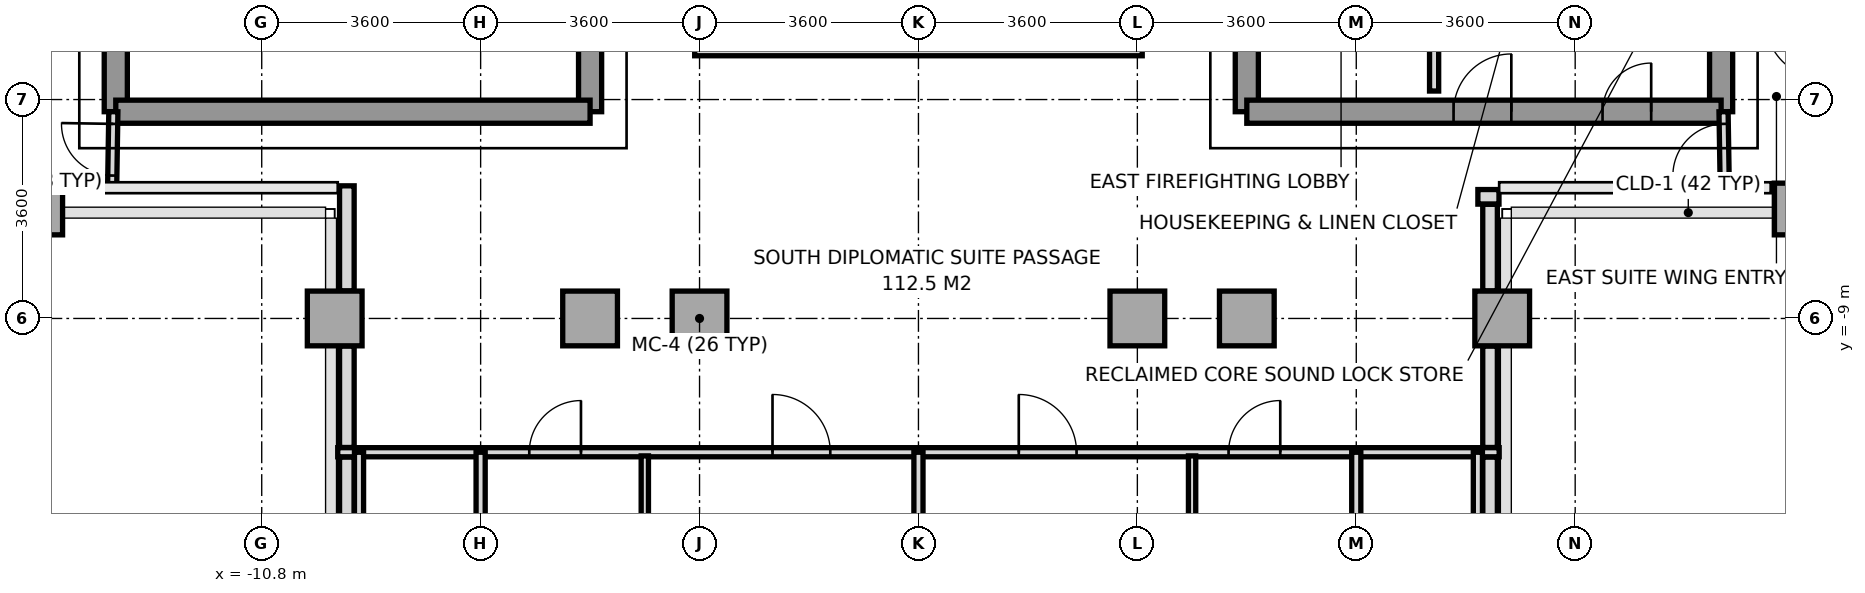
"""IFC4 building model, lengths in metres.
Left out: names, types, materials, properties, quantities, classifications, styles, units other than length and angle.
Written with IfcOpenShell. Run it as: python <this file> out.ifc"""

import sys

from ifc_helpers import new_model, si_unit, direction, frame, frame_2d, origin, origin_2d, place, context, subcontext, project, spatial, rectangle, extrude, source, transform, mapped, element, fill, save


model = new_model("IFC4")
c1 = context("Model", 3, precision=1e-05, world=origin(), true_north=direction((0.0, 1.0)))
c2 = subcontext(c1, "Body", "Model", "MODEL_VIEW")
j1 = project(units=[si_unit("LENGTHUNIT", "METRE"), si_unit("PLANEANGLEUNIT", "RADIAN")], contexts=[c1])
p1 = place(None, origin())
s1 = spatial("IfcSite", under=j1, at=p1, CompositionType="ELEMENT")
p2 = place(p1, origin())
s2 = spatial("IfcBuilding", under=s1, at=p2, CompositionType="ELEMENT")
p3 = place(p2, frame((0.0, 0.0, 197.8)))
s3 = spatial("IfcBuildingStorey", under=s2, at=p3, CompositionType="ELEMENT", Elevation=197.8)
m1 = source(origin(), c2, "Body", "SweptSolid", [
    extrude(rectangle(XDim=0.65, YDim=0.85, at=origin_2d()), origin(), (0.0, 0.0, 1.0), 3.2),
])
p4 = place(p3, frame((-14.4, -7.2, 0.0), z_axis=(0.0, 0.0, 1.0), x_axis=(1.0, 0.0, 0.0)))
e1 = element("IfcColumn", 1, at=p4, inside=s3, PredefinedType="COLUMN", context=c2, shape_type="MappedRepresentation", body=[
    mapped(m1, transform((0.0, 0.0, 0.0), x_axis=(1.0, 0.0, 0.0), y_axis=(0.0, 1.0, 0.0), z_axis=(0.0, 0.0, 1.0), scale=1.0)),
])
m2 = source(origin(), c2, "Body", "SweptSolid", [
    extrude(rectangle(XDim=0.9, YDim=0.9, at=origin_2d()), origin(), (0.0, 0.0, 1.0), 3.2),
])
for number, where, z_axis, x_axis in (
    (2, (-9.6, -9.0, 0.0), (0.0, 0.0, 1.0), (1.0, 0.0, 0.0)),
    (3, (-5.4, -9.0, 0.0), (0.0, 0.0, 1.0), (1.0, 0.0, 0.0)),
    (4, (-3.6, -9.0, 0.0), (0.0, 0.0, 1.0), (1.0, 0.0, 0.0)),
    (5, (3.6, -9.0, 0.0), (0.0, 0.0, 1.0), (1.0, 0.0, 0.0)),
    (6, (5.4, -9.0, 0.0), (0.0, 0.0, 1.0), (1.0, 0.0, 0.0)),
    (7, (9.6, -9.0, 0.0), (0.0, 0.0, 1.0), (1.0, 0.0, 0.0)),
):
    element("IfcColumn", number, at=place(p3, frame(where, z_axis=z_axis, x_axis=x_axis)), inside=s3, PredefinedType="COLUMN", context=c2, shape_type="MappedRepresentation", body=[
        mapped(m2, transform((0.0, 0.0, 0.0), x_axis=(1.0, 0.0, 0.0), y_axis=(0.0, 1.0, 0.0), z_axis=(0.0, 0.0, 1.0), scale=1.0)),
    ])
p5 = place(p3, frame((14.4, -7.2, 0.0), z_axis=(0.0, 0.0, 1.0), x_axis=(1.0, 0.0, 0.0)))
e8 = element("IfcColumn", 8, at=p5, inside=s3, PredefinedType="COLUMN", context=c2, shape_type="MappedRepresentation", body=[
    mapped(m1, transform((0.0, 0.0, 0.0), x_axis=(1.0, 0.0, 0.0), y_axis=(0.0, 1.0, 0.0), z_axis=(0.0, 0.0, 1.0), scale=1.0)),
])
p6 = place(p3, frame((9.547, -7.0, 0.0), z_axis=(0.0, 0.0, 1.0), x_axis=(-1.0, 0.0, 0.0)))
e9 = element("IfcWall", 9, at=p6, inside=s3, PredefinedType="PARAPET", context=c2, shape_type="SweptSolid", body=[
    extrude(rectangle(XDim=0.347, YDim=0.24, at=frame_2d((0.174, 0.0))), origin(), (0.0, 0.0, 1.0), 1.15),
])
p7 = place(p3, frame((9.4, -7.123, 0.0), z_axis=(0.0, 0.0, 1.0), x_axis=(0.0, -1.0, 0.0)))
e10 = element("IfcWall", 10, at=p7, inside=s3, PredefinedType="PARAPET", context=c2, shape_type="SweptSolid", body=[
    extrude(rectangle(XDim=1.424, YDim=0.24, at=frame_2d((0.712, 0.0))), origin(), (0.0, 0.0, 1.0), 1.15),
])
p8 = place(p3, frame((9.4, -9.453, 0.0), z_axis=(0.0, 0.0, 1.0), x_axis=(0.0, -1.0, 0.0)))
e11 = element("IfcWall", 11, at=p8, inside=s3, PredefinedType="PARAPET", context=c2, shape_type="SweptSolid", body=[
    extrude(rectangle(XDim=1.669, YDim=0.24, at=frame_2d((0.834, 0.0))), origin(), (0.0, 0.0, 1.0), 1.15),
])
p9 = place(p3, frame((9.4, -11.278, 0.0), z_axis=(0.0, 0.0, 1.0), x_axis=(0.0, -1.0, 0.0)))
e12 = element("IfcWall", 12, at=p9, inside=s3, PredefinedType="PARAPET", context=c2, shape_type="SweptSolid", body=[
    extrude(rectangle(XDim=4.325, YDim=0.24, at=frame_2d((2.162, 0.0))), origin(), (0.0, 0.0, 1.0), 1.15),
])
p10 = place(p3, frame((-9.4, -15.358, 0.0), z_axis=(0.0, 0.0, 1.0), x_axis=(0.0, 1.0, 0.0)))
e13 = element("IfcWall", 13, at=p10, inside=s3, PredefinedType="PARAPET", context=c2, shape_type="SweptSolid", body=[
    extrude(rectangle(XDim=4.08, YDim=0.24, at=frame_2d((2.04, 0.0))), origin(), (0.0, 0.0, 1.0), 1.15),
])
p11 = place(p3, frame((-9.4, -11.122, 0.0), z_axis=(0.0, 0.0, 1.0), x_axis=(0.0, 1.0, 0.0)))
e14 = element("IfcWall", 14, at=p11, inside=s3, PredefinedType="PARAPET", context=c2, shape_type="SweptSolid", body=[
    extrude(rectangle(XDim=1.669, YDim=0.24, at=frame_2d((0.834, 0.0))), origin(), (0.0, 0.0, 1.0), 1.15),
])
p12 = place(p3, frame((-9.4, -8.547, 0.0), z_axis=(0.0, 0.0, 1.0), x_axis=(0.0, 1.0, 0.0)))
e15 = element("IfcWall", 15, at=p12, inside=s3, PredefinedType="PARAPET", context=c2, shape_type="SweptSolid", body=[
    extrude(rectangle(XDim=1.728, YDim=0.24, at=frame_2d((0.864, 0.0))), origin(), (0.0, 0.0, 1.0), 1.15),
])
p13 = place(p3, frame((-13.2, -5.6, 0.0), z_axis=(0.0, 0.0, 1.0), x_axis=(0.0, 1.0, 0.0)))
e16 = element("IfcWall", 16, at=p13, inside=s3, PredefinedType="SHEAR", context=c2, shape_type="SweptSolid", body=[
    extrude(rectangle(XDim=11.2, YDim=0.38, at=frame_2d((5.6, 0.0))), origin(), (0.0, 0.0, 1.0), 3.2),
])
p14 = place(p3, frame((-5.4, -5.6, 0.0), z_axis=(0.0, 0.0, 1.0), x_axis=(0.0, 1.0, 0.0)))
e17 = element("IfcWall", 17, at=p14, inside=s3, PredefinedType="SHEAR", context=c2, shape_type="SweptSolid", body=[
    extrude(rectangle(XDim=12.5, YDim=0.38, at=frame_2d((6.25, 0.0))), origin(), (0.0, 0.0, 1.0), 3.2),
])
p15 = place(p14, frame((4.55, 0.0, 0.0)))
e18 = element("IfcOpeningElement", 18, at=p15, cuts=e17, PredefinedType="OPENING", context=c2, shape_type="SweptSolid", body=[
    extrude(rectangle(XDim=1.2, YDim=2.2, at=frame_2d((0.6, 1.1))), frame((0.0, 0.2, 0.0), z_axis=(0.0, -1.0, 0.0), x_axis=(1.0, 0.0, 0.0)), (0.0, 0.0, 1.0), 0.4),
])
p16 = place(p14, frame((10.45, 0.0, 0.0)))
e19 = element("IfcOpeningElement", 19, at=p16, cuts=e17, PredefinedType="OPENING", context=c2, shape_type="SweptSolid", body=[
    extrude(rectangle(XDim=1.2, YDim=2.2, at=frame_2d((0.6, 1.1))), frame((0.0, 0.2, 0.0), z_axis=(0.0, -1.0, 0.0), x_axis=(1.0, 0.0, 0.0)), (0.0, 0.0, 1.0), 0.4),
])
p17 = place(p3, frame((-13.2, -5.6, 0.0), z_axis=(0.0, 0.0, 1.0), x_axis=(1.0, 0.0, 0.0)))
e20 = element("IfcWall", 20, at=p17, inside=s3, PredefinedType="SHEAR", context=c2, shape_type="SweptSolid", body=[
    extrude(rectangle(XDim=7.8, YDim=0.38, at=frame_2d((3.9, 0.0))), origin(), (0.0, 0.0, 1.0), 3.2),
])
p18 = place(p3, frame((13.2, -5.6, 0.0), z_axis=(0.0, 0.0, 1.0), x_axis=(0.0, 1.0, 0.0)))
e21 = element("IfcWall", 21, at=p18, inside=s3, PredefinedType="SHEAR", context=c2, shape_type="SweptSolid", body=[
    extrude(rectangle(XDim=11.2, YDim=0.38, at=frame_2d((5.6, 0.0))), origin(), (0.0, 0.0, 1.0), 3.2),
])
p19 = place(p3, frame((5.4, -5.6, 0.0), z_axis=(0.0, 0.0, 1.0), x_axis=(0.0, 1.0, 0.0)))
e22 = element("IfcWall", 22, at=p19, inside=s3, PredefinedType="SHEAR", context=c2, shape_type="SweptSolid", body=[
    extrude(rectangle(XDim=12.5, YDim=0.38, at=frame_2d((6.25, 0.0))), origin(), (0.0, 0.0, 1.0), 3.2),
])
p20 = place(p19, frame((4.55, 0.0, 0.0)))
e23 = element("IfcOpeningElement", 23, at=p20, cuts=e22, PredefinedType="OPENING", context=c2, shape_type="SweptSolid", body=[
    extrude(rectangle(XDim=1.2, YDim=2.2, at=frame_2d((0.6, 1.1))), frame((0.0, 0.2, 0.0), z_axis=(0.0, -1.0, 0.0), x_axis=(1.0, 0.0, 0.0)), (0.0, 0.0, 1.0), 0.4),
])
p21 = place(p19, frame((10.45, 0.0, 0.0)))
e24 = element("IfcOpeningElement", 24, at=p21, cuts=e22, PredefinedType="OPENING", context=c2, shape_type="SweptSolid", body=[
    extrude(rectangle(XDim=1.2, YDim=2.2, at=frame_2d((0.6, 1.1))), frame((0.0, 0.2, 0.0), z_axis=(0.0, -1.0, 0.0), x_axis=(1.0, 0.0, 0.0)), (0.0, 0.0, 1.0), 0.4),
])
p22 = place(p19, frame((7.88, 0.0, 0.0)))
e25 = element("IfcOpeningElement", 25, at=p22, cuts=e22, PredefinedType="OPENING", context=c2, shape_type="SweptSolid", body=[
    extrude(rectangle(XDim=0.8, YDim=2.1, at=frame_2d((0.4, 1.05))), frame((0.0, 0.2, 0.0), z_axis=(0.0, -1.0, 0.0), x_axis=(1.0, 0.0, 0.0)), (0.0, 0.0, 1.0), 0.4),
])
p23 = place(p3, frame((5.4, -5.6, 0.0), z_axis=(0.0, 0.0, 1.0), x_axis=(1.0, 0.0, 0.0)))
e26 = element("IfcWall", 26, at=p23, inside=s3, PredefinedType="SHEAR", context=c2, shape_type="SweptSolid", body=[
    extrude(rectangle(XDim=7.8, YDim=0.38, at=frame_2d((3.9, 0.0))), origin(), (0.0, 0.0, 1.0), 3.2),
])
p24 = place(p23, frame((5.85, 0.0, 0.0)))
e27 = element("IfcOpeningElement", 27, at=p24, cuts=e26, PredefinedType="OPENING", context=c2, shape_type="SweptSolid", body=[
    extrude(rectangle(XDim=0.8, YDim=2.1, at=frame_2d((0.4, 1.05))), frame((0.0, 0.2, 0.0), z_axis=(0.0, -1.0, 0.0), x_axis=(1.0, 0.0, 0.0)), (0.0, 0.0, 1.0), 0.4),
])
p25 = place(p23, frame((3.4, 0.0, 0.0)))
e28 = element("IfcOpeningElement", 28, at=p25, cuts=e26, PredefinedType="OPENING", context=c2, shape_type="SweptSolid", body=[
    extrude(rectangle(XDim=0.95, YDim=2.15, at=frame_2d((0.475, 1.075))), frame((0.0, 0.2, 0.0), z_axis=(0.0, -1.0, 0.0), x_axis=(1.0, 0.0, 0.0)), (0.0, 0.0, 1.0), 0.4),
])
p26 = place(p3, frame((8.48, -5.26, 0.0), z_axis=(0.0, 0.0, 1.0), x_axis=(0.0, 1.0, 0.0)))
e29 = element("IfcWall", 29, at=p26, inside=s3, PredefinedType="PARTITIONING", context=c2, shape_type="SweptSolid", body=[
    extrude(rectangle(XDim=2.94, YDim=0.15, at=frame_2d((1.47, 0.0))), origin(), (0.0, 0.0, 1.0), 3.2),
])
p27 = place(p3, frame((-9.55, -11.2, 0.0), z_axis=(0.0, 0.0, 1.0), x_axis=(1.0, 0.0, 0.0)))
e30 = element("IfcWall", 30, at=p27, inside=s3, PredefinedType="PARTITIONING", context=c2, shape_type="SweptSolid", body=[
    extrude(rectangle(XDim=19.1, YDim=0.15, at=frame_2d((9.55, 0.0))), origin(), (0.0, 0.0, 1.0), 3.2),
])
p28 = place(p27, frame((3.15, 0.0, 0.0)))
e31 = element("IfcOpeningElement", 31, at=p28, cuts=e30, PredefinedType="OPENING", context=c2, shape_type="SweptSolid", body=[
    extrude(rectangle(XDim=0.85, YDim=2.1, at=frame_2d((0.425, 1.05))), frame((0.0, 0.085, 0.0), z_axis=(0.0, -1.0, 0.0), x_axis=(1.0, 0.0, 0.0)), (0.0, 0.0, 1.0), 0.17),
])
p29 = place(p27, frame((7.15, 0.0, 0.0)))
e32 = element("IfcOpeningElement", 32, at=p29, cuts=e30, PredefinedType="OPENING", context=c2, shape_type="SweptSolid", body=[
    extrude(rectangle(XDim=0.95, YDim=2.15, at=frame_2d((0.475, 1.075))), frame((0.0, 0.085, 0.0), z_axis=(0.0, -1.0, 0.0), x_axis=(1.0, 0.0, 0.0)), (0.0, 0.0, 1.0), 0.17),
])
p30 = place(p27, frame((14.65, 0.0, 0.0)))
e33 = element("IfcOpeningElement", 33, at=p30, cuts=e30, PredefinedType="OPENING", context=c2, shape_type="SweptSolid", body=[
    extrude(rectangle(XDim=0.85, YDim=2.1, at=frame_2d((0.425, 1.05))), frame((0.0, 0.085, 0.0), z_axis=(0.0, -1.0, 0.0), x_axis=(1.0, 0.0, 0.0)), (0.0, 0.0, 1.0), 0.17),
])
p31 = place(p27, frame((11.2, 0.0, 0.0)))
e34 = element("IfcOpeningElement", 34, at=p31, cuts=e30, PredefinedType="OPENING", context=c2, shape_type="SweptSolid", body=[
    extrude(rectangle(XDim=0.95, YDim=2.15, at=frame_2d((0.475, 1.075))), frame((0.0, 0.085, 0.0), z_axis=(0.0, -1.0, 0.0), x_axis=(1.0, 0.0, 0.0)), (0.0, 0.0, 1.0), 0.17),
])
for number, where, z_axis, x_axis in (
    (35, (-9.2, -15.68, 0.0), (0.0, 0.0, 1.0), (0.0, 1.0, 0.0)),
    (36, (9.2, -15.68, 0.0), (0.0, 0.0, 1.0), (0.0, 1.0, 0.0)),
):
    element("IfcWall", number, at=place(p3, frame(where, z_axis=z_axis, x_axis=x_axis)), inside=s3, PredefinedType="PARTITIONING", context=c2, shape_type="SweptSolid", body=[
        extrude(rectangle(XDim=4.48, YDim=0.15, at=frame_2d((2.24, 0.0))), origin(), (0.0, 0.0, 1.0), 3.2),
    ])
p32 = place(p3, frame((-7.2, -23.4, 0.0), z_axis=(0.0, 0.0, 1.0), x_axis=(0.0, 1.0, 0.0)))
e37 = element("IfcWall", 37, at=p32, inside=s3, PredefinedType="PARTITIONING", context=c2, shape_type="SweptSolid", body=[
    extrude(rectangle(XDim=12.2, YDim=0.15, at=frame_2d((6.1, 0.0))), origin(), (0.0, 0.0, 1.0), 2.75),
])
p33 = place(p3, frame((0.0, -24.65, 0.0), z_axis=(0.0, 0.0, 1.0), x_axis=(0.0, 1.0, 0.0)))
e38 = element("IfcWall", 38, at=p33, inside=s3, PredefinedType="PARTITIONING", context=c2, shape_type="SweptSolid", body=[
    extrude(rectangle(XDim=13.45, YDim=0.15, at=frame_2d((6.725, 0.0))), origin(), (0.0, 0.0, 1.0), 2.75),
])
p34 = place(p3, frame((7.2, -23.4, 0.0), z_axis=(0.0, 0.0, 1.0), x_axis=(0.0, 1.0, 0.0)))
e39 = element("IfcWall", 39, at=p34, inside=s3, PredefinedType="PARTITIONING", context=c2, shape_type="SweptSolid", body=[
    extrude(rectangle(XDim=12.2, YDim=0.15, at=frame_2d((6.1, 0.0))), origin(), (0.0, 0.0, 1.0), 2.75),
])
for number, where, z_axis, x_axis in (
    (40, (-4.5, -14.36, 0.0), (0.0, 0.0, 1.0), (0.0, 1.0, 0.0)),
    (41, (4.5, -14.36, 0.0), (0.0, 0.0, 1.0), (0.0, 1.0, 0.0)),
):
    element("IfcWall", number, at=place(p3, frame(where, z_axis=z_axis, x_axis=x_axis)), inside=s3, PredefinedType="PARTITIONING", context=c2, shape_type="SweptSolid", body=[
        extrude(rectangle(XDim=3.1, YDim=0.12, at=frame_2d((1.55, 0.0))), origin(), (0.0, 0.0, 1.0), 2.75),
    ])
p35 = place(p3, frame((-13.26, -6.85, 0.0), z_axis=(0.0, 0.0, 1.0), x_axis=(0.016013571389, 0.999871774545, 0.0)))
e42 = element("IfcWall", 42, at=p35, inside=s3, PredefinedType="PARTITIONING", context=c2, shape_type="SweptSolid", body=[
    extrude(rectangle(XDim=1.25, YDim=0.15, at=frame_2d((0.625, 0.0))), origin(), (0.0, 0.0, 1.0), 3.2),
])
p36 = place(p35, frame((0.2, 0.0, 0.0)))
e43 = element("IfcOpeningElement", 43, at=p36, cuts=e42, PredefinedType="OPENING", context=c2, shape_type="SweptSolid", body=[
    extrude(rectangle(XDim=0.85, YDim=2.1, at=frame_2d((0.425, 1.05))), frame((0.0, 0.085, 0.0), z_axis=(0.0, -1.0, 0.0), x_axis=(1.0, 0.0, 0.0)), (0.0, 0.0, 1.0), 0.17),
])
p37 = place(p3, frame((13.26, -6.85, 0.0), z_axis=(0.0, 0.0, 1.0), x_axis=(-0.016013571389, 0.999871774545, 0.0)))
e44 = element("IfcWall", 44, at=p37, inside=s3, PredefinedType="PARTITIONING", context=c2, shape_type="SweptSolid", body=[
    extrude(rectangle(XDim=1.25, YDim=0.15, at=frame_2d((0.625, 0.0))), origin(), (0.0, 0.0, 1.0), 3.2),
])
p38 = place(p37, frame((0.2, 0.0, 0.0)))
e45 = element("IfcOpeningElement", 45, at=p38, cuts=e44, PredefinedType="OPENING", context=c2, shape_type="SweptSolid", body=[
    extrude(rectangle(XDim=0.85, YDim=2.1, at=frame_2d((0.425, 1.05))), frame((0.0, 0.085, 0.0), z_axis=(0.0, -1.0, 0.0), x_axis=(1.0, 0.0, 0.0)), (0.0, 0.0, 1.0), 0.17),
])
p39 = place(p3, frame((-3.68, -4.56, 0.0), z_axis=(0.0, 0.0, 1.0), x_axis=(1.0, 0.0, 0.0)))
e46 = element("IfcWall", 46, at=p39, inside=s3, PredefinedType="PARAPET", context=c2, shape_type="SweptSolid", body=[
    extrude(rectangle(XDim=7.36, YDim=0.24, at=frame_2d((3.68, 0.0))), origin(), (0.0, 0.0, 1.0), 1.15),
])
m3 = source(origin(), c2, "Body", "SweptSolid", [
    extrude(rectangle(XDim=0.8, YDim=2.1, at=frame_2d((0.4, 1.05))), frame((0.0, 0.025, 0.0), z_axis=(0.0, -1.0, 0.0), x_axis=(1.0, 0.0, 0.0)), (0.0, 0.0, 1.0), 0.05),
])
p40 = place(p24, origin())
e47 = element("IfcDoor", 47, at=p40, inside=s3, OperationType="SINGLE_SWING_RIGHT", PredefinedType="DOOR", context=c2, shape_type="MappedRepresentation", body=[
    mapped(m3, transform((0.0, 0.0, 0.0), x_axis=(1.0, 0.0, 0.0), y_axis=(0.0, 1.0, 0.0), z_axis=(0.0, 0.0, 1.0), scale=1.0)),
])
fill(e27, e47)
m4 = source(origin(), c2, "Body", "SweptSolid", [
    extrude(rectangle(XDim=0.95, YDim=2.15, at=frame_2d((0.475, 1.075))), frame((0.0, 0.025, 0.0), z_axis=(0.0, -1.0, 0.0), x_axis=(1.0, 0.0, 0.0)), (0.0, 0.0, 1.0), 0.05),
])
p41 = place(p25, origin())
e48 = element("IfcDoor", 48, at=p41, inside=s3, OperationType="SINGLE_SWING_RIGHT", PredefinedType="DOOR", context=c2, shape_type="MappedRepresentation", body=[
    mapped(m4, transform((0.0, 0.0, 0.0), x_axis=(1.0, 0.0, 0.0), y_axis=(0.0, 1.0, 0.0), z_axis=(0.0, 0.0, 1.0), scale=1.0)),
])
fill(e28, e48)
m5 = source(origin(), c2, "Body", "SweptSolid", [
    extrude(rectangle(XDim=0.85, YDim=2.1, at=frame_2d((0.425, 1.05))), frame((0.0, 0.025, 0.0), z_axis=(0.0, -1.0, 0.0), x_axis=(1.0, 0.0, 0.0)), (0.0, 0.0, 1.0), 0.05),
])
p42 = place(p28, origin())
e49 = element("IfcDoor", 49, at=p42, inside=s3, OperationType="SINGLE_SWING_RIGHT", PredefinedType="DOOR", context=c2, shape_type="MappedRepresentation", body=[
    mapped(m5, transform((0.0, 0.0, 0.0), x_axis=(1.0, 0.0, 0.0), y_axis=(0.0, 1.0, 0.0), z_axis=(0.0, 0.0, 1.0), scale=1.0)),
])
fill(e31, e49)
p43 = place(p29, origin())
e50 = element("IfcDoor", 50, at=p43, inside=s3, OperationType="SINGLE_SWING_LEFT", PredefinedType="DOOR", context=c2, shape_type="MappedRepresentation", body=[
    mapped(m4, transform((0.0, 0.0, 0.0), x_axis=(1.0, 0.0, 0.0), y_axis=(0.0, 1.0, 0.0), z_axis=(0.0, 0.0, 1.0), scale=1.0)),
])
fill(e32, e50)
p44 = place(p30, origin())
e51 = element("IfcDoor", 51, at=p44, inside=s3, OperationType="SINGLE_SWING_RIGHT", PredefinedType="DOOR", context=c2, shape_type="MappedRepresentation", body=[
    mapped(m5, transform((0.0, 0.0, 0.0), x_axis=(1.0, 0.0, 0.0), y_axis=(0.0, 1.0, 0.0), z_axis=(0.0, 0.0, 1.0), scale=1.0)),
])
fill(e33, e51)
p45 = place(p31, origin())
e52 = element("IfcDoor", 52, at=p45, inside=s3, OperationType="SINGLE_SWING_LEFT", PredefinedType="DOOR", context=c2, shape_type="MappedRepresentation", body=[
    mapped(m4, transform((0.0, 0.0, 0.0), x_axis=(1.0, 0.0, 0.0), y_axis=(0.0, 1.0, 0.0), z_axis=(0.0, 0.0, 1.0), scale=1.0)),
])
fill(e34, e52)
p46 = place(p36, origin())
e53 = element("IfcDoor", 53, at=p46, inside=s3, OperationType="SINGLE_SWING_RIGHT", PredefinedType="DOOR", context=c2, shape_type="MappedRepresentation", body=[
    mapped(m5, transform((0.0, 0.0, 0.0), x_axis=(1.0, 0.0, 0.0), y_axis=(0.0, 1.0, 0.0), z_axis=(0.0, 0.0, 1.0), scale=1.0)),
])
fill(e43, e53)
p47 = place(p38, origin())
e54 = element("IfcDoor", 54, at=p47, inside=s3, OperationType="SINGLE_SWING_LEFT", PredefinedType="DOOR", context=c2, shape_type="MappedRepresentation", body=[
    mapped(m5, transform((0.0, 0.0, 0.0), x_axis=(1.0, 0.0, 0.0), y_axis=(0.0, 1.0, 0.0), z_axis=(0.0, 0.0, 1.0), scale=1.0)),
])
fill(e45, e54)
save(model, sys.argv[1])
